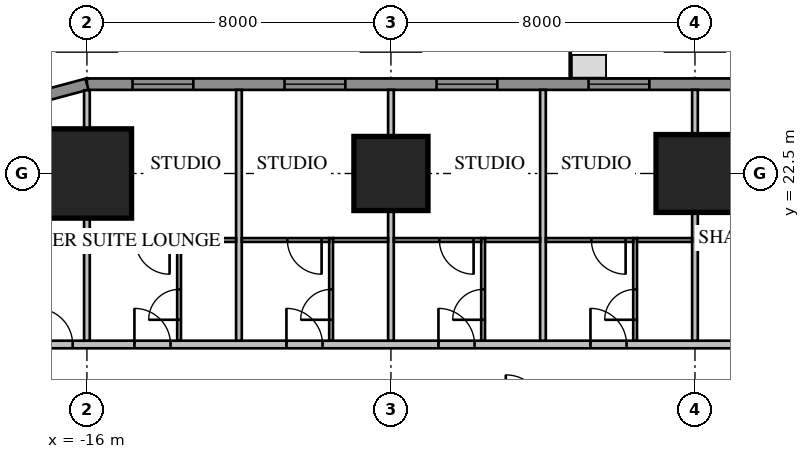
"""IFC4 building model, lengths in metres.
Left out: names, types, materials, properties, quantities, classifications, styles, units other than length and angle.
Written with IfcOpenShell. Run it as: python <this file> out.ifc"""

import sys

from ifc_helpers import new_model, si_unit, direction, frame, frame_2d, origin, origin_2d, place, context, subcontext, project, spatial, rectangle, extrude, element, fill, save


model = new_model("IFC4")
c1 = context("Model", 3, precision=1e-05, world=origin(), true_north=direction((0.0, 1.0)))
c2 = subcontext(c1, "Body", "Model", "MODEL_VIEW")
j1 = project(units=[si_unit("LENGTHUNIT", "METRE"), si_unit("PLANEANGLEUNIT", "RADIAN")], contexts=[c1])
p1 = place(None, origin())
s1 = spatial("IfcSite", under=j1, at=p1, CompositionType="ELEMENT")
p2 = place(p1, origin())
s2 = spatial("IfcBuilding", under=s1, at=p2, CompositionType="ELEMENT")
p3 = place(p2, frame((0.0, 0.0, 19.85)))
s3 = spatial("IfcBuildingStorey", under=s2, at=p3, CompositionType="ELEMENT", Elevation=19.85)
p4 = place(p3, frame((0.0, 22.5, 0.0), z_axis=(0.0, 0.0, 1.0), x_axis=(1.0, 0.0, 0.0)))
e1 = element("IfcColumn", 1, at=p4, inside=s3, PredefinedType="COLUMN", context=c2, shape_type="SweptSolid", body=[
    extrude(rectangle(XDim=2.05, YDim=2.05, at=origin_2d()), origin(), (0.0, 0.0, 1.0), 3.85),
])
p5 = place(p3, frame((-8.0, 22.5, 0.0), z_axis=(0.0, 0.0, 1.0), x_axis=(1.0, 0.0, 0.0)))
e2 = element("IfcColumn", 2, at=p5, inside=s3, PredefinedType="COLUMN", context=c2, shape_type="SweptSolid", body=[
    extrude(rectangle(XDim=1.95, YDim=1.95, at=origin_2d()), origin(), (0.0, 0.0, 1.0), 3.85),
])
p6 = place(p3, frame((-16.0, 22.5, 0.0), z_axis=(0.0, 0.0, 1.0), x_axis=(1.0, 0.0, 0.0)))
e3 = element("IfcColumn", 3, at=p6, inside=s3, PredefinedType="COLUMN", context=c2, shape_type="SweptSolid", body=[
    extrude(rectangle(XDim=2.35, YDim=2.35, at=origin_2d()), origin(), (0.0, 0.0, 1.0), 3.85),
])
p7 = place(p3, frame((16.0, 24.85, 0.0), z_axis=(0.0, 0.0, 1.0), x_axis=(-1.0, 0.0, 0.0)))
e4 = element("IfcWall", 4, at=p7, inside=s3, PredefinedType="SOLIDWALL", context=c2, shape_type="SweptSolid", body=[
    extrude(rectangle(XDim=32.0, YDim=0.3, at=frame_2d((16.0, 0.0))), origin(), (0.0, 0.0, 1.0), 3.65),
])
p8 = place(p7, frame((1.2, 0.0, 0.75)))
e5 = element("IfcOpeningElement", 5, at=p8, cuts=e4, PredefinedType="OPENING", context=c2, shape_type="SweptSolid", body=[
    extrude(rectangle(XDim=1.6, YDim=1.8, at=frame_2d((0.8, 0.9))), frame((0.0, 0.17, 0.0), z_axis=(0.0, -1.0, 0.0), x_axis=(1.0, 0.0, 0.0)), (0.0, 0.0, 1.0), 0.34),
])
p9 = place(p7, frame((5.2, 0.0, 0.75)))
e6 = element("IfcOpeningElement", 6, at=p9, cuts=e4, PredefinedType="OPENING", context=c2, shape_type="SweptSolid", body=[
    extrude(rectangle(XDim=1.6, YDim=1.8, at=frame_2d((0.8, 0.9))), frame((0.0, 0.17, 0.0), z_axis=(0.0, -1.0, 0.0), x_axis=(1.0, 0.0, 0.0)), (0.0, 0.0, 1.0), 0.34),
])
p10 = place(p7, frame((17.2, 0.0, 0.75)))
e7 = element("IfcOpeningElement", 7, at=p10, cuts=e4, PredefinedType="OPENING", context=c2, shape_type="SweptSolid", body=[
    extrude(rectangle(XDim=1.6, YDim=1.8, at=frame_2d((0.8, 0.9))), frame((0.0, 0.17, 0.0), z_axis=(0.0, -1.0, 0.0), x_axis=(1.0, 0.0, 0.0)), (0.0, 0.0, 1.0), 0.34),
])
p11 = place(p7, frame((21.2, 0.0, 0.75)))
e8 = element("IfcOpeningElement", 8, at=p11, cuts=e4, PredefinedType="OPENING", context=c2, shape_type="SweptSolid", body=[
    extrude(rectangle(XDim=1.6, YDim=1.8, at=frame_2d((0.8, 0.9))), frame((0.0, 0.17, 0.0), z_axis=(0.0, -1.0, 0.0), x_axis=(1.0, 0.0, 0.0)), (0.0, 0.0, 1.0), 0.34),
])
p12 = place(p7, frame((25.2, 0.0, 0.75)))
e9 = element("IfcOpeningElement", 9, at=p12, cuts=e4, PredefinedType="OPENING", context=c2, shape_type="SweptSolid", body=[
    extrude(rectangle(XDim=1.6, YDim=1.8, at=frame_2d((0.8, 0.9))), frame((0.0, 0.17, 0.0), z_axis=(0.0, -1.0, 0.0), x_axis=(1.0, 0.0, 0.0)), (0.0, 0.0, 1.0), 0.34),
])
p13 = place(p7, frame((29.2, 0.0, 0.75)))
e10 = element("IfcOpeningElement", 10, at=p13, cuts=e4, PredefinedType="OPENING", context=c2, shape_type="SweptSolid", body=[
    extrude(rectangle(XDim=1.6, YDim=1.8, at=frame_2d((0.8, 0.9))), frame((0.0, 0.17, 0.0), z_axis=(0.0, -1.0, 0.0), x_axis=(1.0, 0.0, 0.0)), (0.0, 0.0, 1.0), 0.34),
])
p14 = place(p7, frame((8.8, 0.0, 0.75)))
e11 = element("IfcOpeningElement", 11, at=p14, cuts=e4, PredefinedType="OPENING", context=c2, shape_type="SweptSolid", body=[
    extrude(rectangle(XDim=2.4, YDim=1.8, at=frame_2d((1.2, 0.9))), frame((0.0, 0.17, 0.0), z_axis=(0.0, -1.0, 0.0), x_axis=(1.0, 0.0, 0.0)), (0.0, 0.0, 1.0), 0.34),
])
p15 = place(p7, frame((13.812, 0.0, 0.0)))
e12 = element("IfcOpeningElement", 12, at=p15, cuts=e4, PredefinedType="OPENING", context=c2, shape_type="SweptSolid", body=[
    extrude(rectangle(XDim=1.0, YDim=2.4, at=frame_2d((0.5, 1.2))), frame((0.0, 0.17, 0.0), z_axis=(0.0, -1.0, 0.0), x_axis=(1.0, 0.0, 0.0)), (0.0, 0.0, 1.0), 0.34),
])
p16 = place(p3, frame((-16.0, 24.85, 0.0), z_axis=(0.0, 0.0, 1.0), x_axis=(-0.965920218567, -0.258839972501, 0.0)))
e13 = element("IfcWall", 13, at=p16, inside=s3, PredefinedType="SOLIDWALL", context=c2, shape_type="SweptSolid", body=[
    extrude(rectangle(XDim=4.581, YDim=0.3, at=frame_2d((2.291, 0.0))), origin(), (0.0, 0.0, 1.0), 3.65),
])
p17 = place(p3, frame((18.0, 18.0, 0.0), z_axis=(0.0, 0.0, 1.0), x_axis=(-1.0, 0.0, 0.0)))
e14 = element("IfcWall", 14, at=p17, inside=s3, PredefinedType="PARTITIONING", context=c2, shape_type="SweptSolid", body=[
    extrude(rectangle(XDim=36.0, YDim=0.2, at=frame_2d((18.0, 0.0))), origin(), (0.0, 0.0, 1.0), 3.65),
])
p18 = place(p17, frame((0.375, 0.0, 0.0)))
e15 = element("IfcOpeningElement", 15, at=p18, cuts=e14, PredefinedType="OPENING", context=c2, shape_type="SweptSolid", body=[
    extrude(rectangle(XDim=1.0, YDim=2.1, at=frame_2d((0.5, 1.05))), frame((0.0, 0.12, 0.0), z_axis=(0.0, -1.0, 0.0), x_axis=(1.0, 0.0, 0.0)), (0.0, 0.0, 1.0), 0.24),
])
p19 = place(p17, frame((3.8, 0.0, 0.0)))
e16 = element("IfcOpeningElement", 16, at=p19, cuts=e14, PredefinedType="OPENING", context=c2, shape_type="SweptSolid", body=[
    extrude(rectangle(XDim=0.95, YDim=2.1, at=frame_2d((0.475, 1.05))), frame((0.0, 0.12, 0.0), z_axis=(0.0, -1.0, 0.0), x_axis=(1.0, 0.0, 0.0)), (0.0, 0.0, 1.0), 0.24),
])
p20 = place(p17, frame((7.8, 0.0, 0.0)))
e17 = element("IfcOpeningElement", 17, at=p20, cuts=e14, PredefinedType="OPENING", context=c2, shape_type="SweptSolid", body=[
    extrude(rectangle(XDim=0.95, YDim=2.1, at=frame_2d((0.475, 1.05))), frame((0.0, 0.12, 0.0), z_axis=(0.0, -1.0, 0.0), x_axis=(1.0, 0.0, 0.0)), (0.0, 0.0, 1.0), 0.24),
])
p21 = place(p17, frame((19.8, 0.0, 0.0)))
e18 = element("IfcOpeningElement", 18, at=p21, cuts=e14, PredefinedType="OPENING", context=c2, shape_type="SweptSolid", body=[
    extrude(rectangle(XDim=0.95, YDim=2.1, at=frame_2d((0.475, 1.05))), frame((0.0, 0.12, 0.0), z_axis=(0.0, -1.0, 0.0), x_axis=(1.0, 0.0, 0.0)), (0.0, 0.0, 1.0), 0.24),
])
p22 = place(p17, frame((23.8, 0.0, 0.0)))
e19 = element("IfcOpeningElement", 19, at=p22, cuts=e14, PredefinedType="OPENING", context=c2, shape_type="SweptSolid", body=[
    extrude(rectangle(XDim=0.95, YDim=2.1, at=frame_2d((0.475, 1.05))), frame((0.0, 0.12, 0.0), z_axis=(0.0, -1.0, 0.0), x_axis=(1.0, 0.0, 0.0)), (0.0, 0.0, 1.0), 0.24),
])
p23 = place(p17, frame((27.8, 0.0, 0.0)))
e20 = element("IfcOpeningElement", 20, at=p23, cuts=e14, PredefinedType="OPENING", context=c2, shape_type="SweptSolid", body=[
    extrude(rectangle(XDim=0.95, YDim=2.1, at=frame_2d((0.475, 1.05))), frame((0.0, 0.12, 0.0), z_axis=(0.0, -1.0, 0.0), x_axis=(1.0, 0.0, 0.0)), (0.0, 0.0, 1.0), 0.24),
])
p24 = place(p17, frame((31.8, 0.0, 0.0)))
e21 = element("IfcOpeningElement", 21, at=p24, cuts=e14, PredefinedType="OPENING", context=c2, shape_type="SweptSolid", body=[
    extrude(rectangle(XDim=0.95, YDim=2.1, at=frame_2d((0.475, 1.05))), frame((0.0, 0.12, 0.0), z_axis=(0.0, -1.0, 0.0), x_axis=(1.0, 0.0, 0.0)), (0.0, 0.0, 1.0), 0.24),
])
p25 = place(p17, frame((34.375, 0.0, 0.0)))
e22 = element("IfcOpeningElement", 22, at=p25, cuts=e14, PredefinedType="OPENING", context=c2, shape_type="SweptSolid", body=[
    extrude(rectangle(XDim=0.95, YDim=2.1, at=frame_2d((0.475, 1.05))), frame((0.0, 0.12, 0.0), z_axis=(0.0, -1.0, 0.0), x_axis=(1.0, 0.0, 0.0)), (0.0, 0.0, 1.0), 0.24),
])
p26 = place(p17, frame((11.2, 0.0, 0.0)))
e23 = element("IfcOpeningElement", 23, at=p26, cuts=e14, PredefinedType="OPENING", context=c2, shape_type="SweptSolid", body=[
    extrude(rectangle(XDim=1.0, YDim=2.1, at=frame_2d((0.5, 1.05))), frame((0.0, 0.12, 0.0), z_axis=(0.0, -1.0, 0.0), x_axis=(1.0, 0.0, 0.0)), (0.0, 0.0, 1.0), 0.24),
])
p27 = place(p3, frame((0.0, 18.1, 0.0), z_axis=(0.0, 0.0, 1.0), x_axis=(0.0, 1.0, 0.0)))
e24 = element("IfcWall", 24, at=p27, inside=s3, PredefinedType="PARTITIONING", context=c2, shape_type="SweptSolid", body=[
    extrude(rectangle(XDim=6.6, YDim=0.15, at=frame_2d((3.3, 0.0))), origin(), (0.0, 0.0, 1.0), 2.809),
])
for number, where, z_axis, x_axis in (
    (25, (-4.0, 18.1, 0.0), (0.0, 0.0, 1.0), (0.0, 1.0, 0.0)),
    (26, (-8.0, 18.1, 0.0), (0.0, 0.0, 1.0), (0.0, 1.0, 0.0)),
    (27, (-12.0, 18.1, 0.0), (0.0, 0.0, 1.0), (0.0, 1.0, 0.0)),
):
    element("IfcWall", number, at=place(p3, frame(where, z_axis=z_axis, x_axis=x_axis)), inside=s3, PredefinedType="PARTITIONING", context=c2, shape_type="SweptSolid", body=[
        extrude(rectangle(XDim=6.6, YDim=0.15, at=frame_2d((3.3, 0.0))), origin(), (0.0, 0.0, 1.0), 3.65),
    ])
p28 = place(p3, frame((-16.0, 18.1, 0.0), z_axis=(0.0, 0.0, 1.0), x_axis=(0.0, 1.0, 0.0)))
e28 = element("IfcWall", 28, at=p28, inside=s3, PredefinedType="PARTITIONING", context=c2, shape_type="SweptSolid", body=[
    extrude(rectangle(XDim=6.589, YDim=0.15, at=frame_2d((3.295, 0.0))), origin(), (0.0, 0.0, 1.0), 3.65),
])
p29 = place(p3, frame((-1.575, 18.1, 0.0), z_axis=(0.0, 0.0, 1.0), x_axis=(0.0, 1.0, 0.0)))
e29 = element("IfcWall", 29, at=p29, inside=s3, PredefinedType="PARTITIONING", context=c2, shape_type="SweptSolid", body=[
    extrude(rectangle(XDim=2.7, YDim=0.1, at=frame_2d((1.35, 0.0))), origin(), (0.0, 0.0, 1.0), 3.65),
])
p30 = place(p29, frame((0.55, 0.0, 0.0)))
e30 = element("IfcOpeningElement", 30, at=p30, cuts=e29, PredefinedType="OPENING", context=c2, shape_type="SweptSolid", body=[
    extrude(rectangle(XDim=0.8, YDim=2.1, at=frame_2d((0.4, 1.05))), frame((0.0, 0.07, 0.0), z_axis=(0.0, -1.0, 0.0), x_axis=(1.0, 0.0, 0.0)), (0.0, 0.0, 1.0), 0.14),
])
p31 = place(p3, frame((-0.075, 20.75, 0.0), z_axis=(0.0, 0.0, 1.0), x_axis=(-1.0, 0.0, 0.0)))
e31 = element("IfcWall", 31, at=p31, inside=s3, PredefinedType="PARTITIONING", context=c2, shape_type="SweptSolid", body=[
    extrude(rectangle(XDim=1.45, YDim=0.1, at=frame_2d((0.725, 0.0))), origin(), (0.0, 0.0, 1.0), 3.65),
])
p32 = place(p3, frame((-5.575, 18.1, 0.0), z_axis=(0.0, 0.0, 1.0), x_axis=(0.0, 1.0, 0.0)))
e32 = element("IfcWall", 32, at=p32, inside=s3, PredefinedType="PARTITIONING", context=c2, shape_type="SweptSolid", body=[
    extrude(rectangle(XDim=2.7, YDim=0.1, at=frame_2d((1.35, 0.0))), origin(), (0.0, 0.0, 1.0), 3.65),
])
p33 = place(p32, frame((0.55, 0.0, 0.0)))
e33 = element("IfcOpeningElement", 33, at=p33, cuts=e32, PredefinedType="OPENING", context=c2, shape_type="SweptSolid", body=[
    extrude(rectangle(XDim=0.8, YDim=2.1, at=frame_2d((0.4, 1.05))), frame((0.0, 0.07, 0.0), z_axis=(0.0, -1.0, 0.0), x_axis=(1.0, 0.0, 0.0)), (0.0, 0.0, 1.0), 0.14),
])
p34 = place(p3, frame((-4.075, 20.75, 0.0), z_axis=(0.0, 0.0, 1.0), x_axis=(-1.0, 0.0, 0.0)))
e34 = element("IfcWall", 34, at=p34, inside=s3, PredefinedType="PARTITIONING", context=c2, shape_type="SweptSolid", body=[
    extrude(rectangle(XDim=1.45, YDim=0.1, at=frame_2d((0.725, 0.0))), origin(), (0.0, 0.0, 1.0), 3.65),
])
p35 = place(p3, frame((-9.575, 18.1, 0.0), z_axis=(0.0, 0.0, 1.0), x_axis=(0.0, 1.0, 0.0)))
e35 = element("IfcWall", 35, at=p35, inside=s3, PredefinedType="PARTITIONING", context=c2, shape_type="SweptSolid", body=[
    extrude(rectangle(XDim=2.7, YDim=0.1, at=frame_2d((1.35, 0.0))), origin(), (0.0, 0.0, 1.0), 3.65),
])
p36 = place(p35, frame((0.55, 0.0, 0.0)))
e36 = element("IfcOpeningElement", 36, at=p36, cuts=e35, PredefinedType="OPENING", context=c2, shape_type="SweptSolid", body=[
    extrude(rectangle(XDim=0.8, YDim=2.1, at=frame_2d((0.4, 1.05))), frame((0.0, 0.07, 0.0), z_axis=(0.0, -1.0, 0.0), x_axis=(1.0, 0.0, 0.0)), (0.0, 0.0, 1.0), 0.14),
])
p37 = place(p3, frame((-8.075, 20.75, 0.0), z_axis=(0.0, 0.0, 1.0), x_axis=(-1.0, 0.0, 0.0)))
e37 = element("IfcWall", 37, at=p37, inside=s3, PredefinedType="PARTITIONING", context=c2, shape_type="SweptSolid", body=[
    extrude(rectangle(XDim=1.45, YDim=0.1, at=frame_2d((0.725, 0.0))), origin(), (0.0, 0.0, 1.0), 3.65),
])
p38 = place(p3, frame((-13.575, 18.1, 0.0), z_axis=(0.0, 0.0, 1.0), x_axis=(0.0, 1.0, 0.0)))
e38 = element("IfcWall", 38, at=p38, inside=s3, PredefinedType="PARTITIONING", context=c2, shape_type="SweptSolid", body=[
    extrude(rectangle(XDim=2.7, YDim=0.1, at=frame_2d((1.35, 0.0))), origin(), (0.0, 0.0, 1.0), 3.65),
])
p39 = place(p38, frame((0.55, 0.0, 0.0)))
e39 = element("IfcOpeningElement", 39, at=p39, cuts=e38, PredefinedType="OPENING", context=c2, shape_type="SweptSolid", body=[
    extrude(rectangle(XDim=0.8, YDim=2.1, at=frame_2d((0.4, 1.05))), frame((0.0, 0.07, 0.0), z_axis=(0.0, -1.0, 0.0), x_axis=(1.0, 0.0, 0.0)), (0.0, 0.0, 1.0), 0.14),
])
p40 = place(p3, frame((-12.075, 20.75, 0.0), z_axis=(0.0, 0.0, 1.0), x_axis=(-1.0, 0.0, 0.0)))
e40 = element("IfcWall", 40, at=p40, inside=s3, PredefinedType="PARTITIONING", context=c2, shape_type="SweptSolid", body=[
    extrude(rectangle(XDim=1.45, YDim=0.1, at=frame_2d((0.725, 0.0))), origin(), (0.0, 0.0, 1.0), 3.65),
])
p41 = place(p3, frame((-1.625, 20.75, 0.0), z_axis=(0.0, 0.0, 1.0), x_axis=(-1.0, 0.0, 0.0)))
e41 = element("IfcWall", 41, at=p41, inside=s3, PredefinedType="PARTITIONING", context=c2, shape_type="SweptSolid", body=[
    extrude(rectangle(XDim=2.3, YDim=0.1, at=frame_2d((1.15, 0.0))), origin(), (0.0, 0.0, 1.0), 3.65),
])
p42 = place(p41, frame((0.2, 0.0, 0.0)))
e42 = element("IfcOpeningElement", 42, at=p42, cuts=e41, PredefinedType="OPENING", context=c2, shape_type="SweptSolid", body=[
    extrude(rectangle(XDim=0.9, YDim=2.1, at=frame_2d((0.45, 1.05))), frame((0.0, 0.07, 0.0), z_axis=(0.0, -1.0, 0.0), x_axis=(1.0, 0.0, 0.0)), (0.0, 0.0, 1.0), 0.14),
])
p43 = place(p3, frame((-5.625, 20.75, 0.0), z_axis=(0.0, 0.0, 1.0), x_axis=(-1.0, 0.0, 0.0)))
e43 = element("IfcWall", 43, at=p43, inside=s3, PredefinedType="PARTITIONING", context=c2, shape_type="SweptSolid", body=[
    extrude(rectangle(XDim=2.3, YDim=0.1, at=frame_2d((1.15, 0.0))), origin(), (0.0, 0.0, 1.0), 3.65),
])
p44 = place(p43, frame((0.2, 0.0, 0.0)))
e44 = element("IfcOpeningElement", 44, at=p44, cuts=e43, PredefinedType="OPENING", context=c2, shape_type="SweptSolid", body=[
    extrude(rectangle(XDim=0.9, YDim=2.1, at=frame_2d((0.45, 1.05))), frame((0.0, 0.07, 0.0), z_axis=(0.0, -1.0, 0.0), x_axis=(1.0, 0.0, 0.0)), (0.0, 0.0, 1.0), 0.14),
])
p45 = place(p3, frame((-9.625, 20.75, 0.0), z_axis=(0.0, 0.0, 1.0), x_axis=(-1.0, 0.0, 0.0)))
e45 = element("IfcWall", 45, at=p45, inside=s3, PredefinedType="PARTITIONING", context=c2, shape_type="SweptSolid", body=[
    extrude(rectangle(XDim=2.3, YDim=0.1, at=frame_2d((1.15, 0.0))), origin(), (0.0, 0.0, 1.0), 3.65),
])
p46 = place(p45, frame((0.2, 0.0, 0.0)))
e46 = element("IfcOpeningElement", 46, at=p46, cuts=e45, PredefinedType="OPENING", context=c2, shape_type="SweptSolid", body=[
    extrude(rectangle(XDim=0.9, YDim=2.1, at=frame_2d((0.45, 1.05))), frame((0.0, 0.07, 0.0), z_axis=(0.0, -1.0, 0.0), x_axis=(1.0, 0.0, 0.0)), (0.0, 0.0, 1.0), 0.14),
])
p47 = place(p3, frame((-13.625, 20.75, 0.0), z_axis=(0.0, 0.0, 1.0), x_axis=(-1.0, 0.0, 0.0)))
e47 = element("IfcWall", 47, at=p47, inside=s3, PredefinedType="PARTITIONING", context=c2, shape_type="SweptSolid", body=[
    extrude(rectangle(XDim=2.3, YDim=0.1, at=frame_2d((1.15, 0.0))), origin(), (0.0, 0.0, 1.0), 3.65),
])
p48 = place(p47, frame((0.2, 0.0, 0.0)))
e48 = element("IfcOpeningElement", 48, at=p48, cuts=e47, PredefinedType="OPENING", context=c2, shape_type="SweptSolid", body=[
    extrude(rectangle(XDim=0.9, YDim=2.1, at=frame_2d((0.45, 1.05))), frame((0.0, 0.07, 0.0), z_axis=(0.0, -1.0, 0.0), x_axis=(1.0, 0.0, 0.0)), (0.0, 0.0, 1.0), 0.14),
])
p49 = place(p10, origin())
e49 = element("IfcWindow", 49, at=p49, inside=s3, PartitioningType="SINGLE_PANEL", PredefinedType="WINDOW", context=c2, shape_type="SweptSolid", body=[
    extrude(rectangle(XDim=1.6, YDim=1.8, at=frame_2d((0.8, 0.9))), frame((0.0, 0.03, 0.0), z_axis=(0.0, -1.0, 0.0), x_axis=(1.0, 0.0, 0.0)), (0.0, 0.0, 1.0), 0.06),
])
fill(e7, e49)
p50 = place(p11, origin())
e50 = element("IfcWindow", 50, at=p50, inside=s3, PartitioningType="SINGLE_PANEL", PredefinedType="WINDOW", context=c2, shape_type="SweptSolid", body=[
    extrude(rectangle(XDim=1.6, YDim=1.8, at=frame_2d((0.8, 0.9))), frame((0.0, 0.03, 0.0), z_axis=(0.0, -1.0, 0.0), x_axis=(1.0, 0.0, 0.0)), (0.0, 0.0, 1.0), 0.06),
])
fill(e8, e50)
p51 = place(p12, origin())
e51 = element("IfcWindow", 51, at=p51, inside=s3, PartitioningType="SINGLE_PANEL", PredefinedType="WINDOW", context=c2, shape_type="SweptSolid", body=[
    extrude(rectangle(XDim=1.6, YDim=1.8, at=frame_2d((0.8, 0.9))), frame((0.0, 0.03, 0.0), z_axis=(0.0, -1.0, 0.0), x_axis=(1.0, 0.0, 0.0)), (0.0, 0.0, 1.0), 0.06),
])
fill(e9, e51)
p52 = place(p13, origin())
e52 = element("IfcWindow", 52, at=p52, inside=s3, PartitioningType="SINGLE_PANEL", PredefinedType="WINDOW", context=c2, shape_type="SweptSolid", body=[
    extrude(rectangle(XDim=1.6, YDim=1.8, at=frame_2d((0.8, 0.9))), frame((0.0, 0.03, 0.0), z_axis=(0.0, -1.0, 0.0), x_axis=(1.0, 0.0, 0.0)), (0.0, 0.0, 1.0), 0.06),
])
fill(e10, e52)
p53 = place(p21, origin())
e53 = element("IfcDoor", 53, at=p53, inside=s3, OperationType="SINGLE_SWING_RIGHT", PredefinedType="DOOR", context=c2, shape_type="SweptSolid", body=[
    extrude(rectangle(XDim=0.95, YDim=2.1, at=frame_2d((0.475, 1.05))), frame((0.0, 0.025, 0.0), z_axis=(0.0, -1.0, 0.0), x_axis=(1.0, 0.0, 0.0)), (0.0, 0.0, 1.0), 0.05),
])
fill(e18, e53)
p54 = place(p30, origin())
e54 = element("IfcDoor", 54, at=p54, inside=s3, OperationType="SINGLE_SWING_LEFT", PredefinedType="DOOR", context=c2, shape_type="SweptSolid", body=[
    extrude(rectangle(XDim=0.8, YDim=2.1, at=frame_2d((0.4, 1.05))), frame((0.0, 0.025, 0.0), z_axis=(0.0, -1.0, 0.0), x_axis=(1.0, 0.0, 0.0)), (0.0, 0.0, 1.0), 0.05),
])
fill(e30, e54)
p55 = place(p22, origin())
e55 = element("IfcDoor", 55, at=p55, inside=s3, OperationType="SINGLE_SWING_RIGHT", PredefinedType="DOOR", context=c2, shape_type="SweptSolid", body=[
    extrude(rectangle(XDim=0.95, YDim=2.1, at=frame_2d((0.475, 1.05))), frame((0.0, 0.025, 0.0), z_axis=(0.0, -1.0, 0.0), x_axis=(1.0, 0.0, 0.0)), (0.0, 0.0, 1.0), 0.05),
])
fill(e19, e55)
p56 = place(p33, origin())
e56 = element("IfcDoor", 56, at=p56, inside=s3, OperationType="SINGLE_SWING_LEFT", PredefinedType="DOOR", context=c2, shape_type="SweptSolid", body=[
    extrude(rectangle(XDim=0.8, YDim=2.1, at=frame_2d((0.4, 1.05))), frame((0.0, 0.025, 0.0), z_axis=(0.0, -1.0, 0.0), x_axis=(1.0, 0.0, 0.0)), (0.0, 0.0, 1.0), 0.05),
])
fill(e33, e56)
p57 = place(p23, origin())
e57 = element("IfcDoor", 57, at=p57, inside=s3, OperationType="SINGLE_SWING_RIGHT", PredefinedType="DOOR", context=c2, shape_type="SweptSolid", body=[
    extrude(rectangle(XDim=0.95, YDim=2.1, at=frame_2d((0.475, 1.05))), frame((0.0, 0.025, 0.0), z_axis=(0.0, -1.0, 0.0), x_axis=(1.0, 0.0, 0.0)), (0.0, 0.0, 1.0), 0.05),
])
fill(e20, e57)
p58 = place(p36, origin())
e58 = element("IfcDoor", 58, at=p58, inside=s3, OperationType="SINGLE_SWING_LEFT", PredefinedType="DOOR", context=c2, shape_type="SweptSolid", body=[
    extrude(rectangle(XDim=0.8, YDim=2.1, at=frame_2d((0.4, 1.05))), frame((0.0, 0.025, 0.0), z_axis=(0.0, -1.0, 0.0), x_axis=(1.0, 0.0, 0.0)), (0.0, 0.0, 1.0), 0.05),
])
fill(e36, e58)
p59 = place(p24, origin())
e59 = element("IfcDoor", 59, at=p59, inside=s3, OperationType="SINGLE_SWING_RIGHT", PredefinedType="DOOR", context=c2, shape_type="SweptSolid", body=[
    extrude(rectangle(XDim=0.95, YDim=2.1, at=frame_2d((0.475, 1.05))), frame((0.0, 0.025, 0.0), z_axis=(0.0, -1.0, 0.0), x_axis=(1.0, 0.0, 0.0)), (0.0, 0.0, 1.0), 0.05),
])
fill(e21, e59)
p60 = place(p39, origin())
e60 = element("IfcDoor", 60, at=p60, inside=s3, OperationType="SINGLE_SWING_LEFT", PredefinedType="DOOR", context=c2, shape_type="SweptSolid", body=[
    extrude(rectangle(XDim=0.8, YDim=2.1, at=frame_2d((0.4, 1.05))), frame((0.0, 0.025, 0.0), z_axis=(0.0, -1.0, 0.0), x_axis=(1.0, 0.0, 0.0)), (0.0, 0.0, 1.0), 0.05),
])
fill(e39, e60)
p61 = place(p25, origin())
e61 = element("IfcDoor", 61, at=p61, inside=s3, OperationType="SINGLE_SWING_RIGHT", PredefinedType="DOOR", context=c2, shape_type="SweptSolid", body=[
    extrude(rectangle(XDim=0.95, YDim=2.1, at=frame_2d((0.475, 1.05))), frame((0.0, 0.025, 0.0), z_axis=(0.0, -1.0, 0.0), x_axis=(1.0, 0.0, 0.0)), (0.0, 0.0, 1.0), 0.05),
])
fill(e22, e61)
p62 = place(p42, origin())
e62 = element("IfcDoor", 62, at=p62, inside=s3, OperationType="SINGLE_SWING_LEFT", PredefinedType="DOOR", context=c2, shape_type="SweptSolid", body=[
    extrude(rectangle(XDim=0.9, YDim=2.1, at=frame_2d((0.45, 1.05))), frame((0.0, 0.025, 0.0), z_axis=(0.0, -1.0, 0.0), x_axis=(1.0, 0.0, 0.0)), (0.0, 0.0, 1.0), 0.05),
])
fill(e42, e62)
p63 = place(p44, origin())
e63 = element("IfcDoor", 63, at=p63, inside=s3, OperationType="SINGLE_SWING_LEFT", PredefinedType="DOOR", context=c2, shape_type="SweptSolid", body=[
    extrude(rectangle(XDim=0.9, YDim=2.1, at=frame_2d((0.45, 1.05))), frame((0.0, 0.025, 0.0), z_axis=(0.0, -1.0, 0.0), x_axis=(1.0, 0.0, 0.0)), (0.0, 0.0, 1.0), 0.05),
])
fill(e44, e63)
p64 = place(p46, origin())
e64 = element("IfcDoor", 64, at=p64, inside=s3, OperationType="SINGLE_SWING_LEFT", PredefinedType="DOOR", context=c2, shape_type="SweptSolid", body=[
    extrude(rectangle(XDim=0.9, YDim=2.1, at=frame_2d((0.45, 1.05))), frame((0.0, 0.025, 0.0), z_axis=(0.0, -1.0, 0.0), x_axis=(1.0, 0.0, 0.0)), (0.0, 0.0, 1.0), 0.05),
])
fill(e46, e64)
p65 = place(p48, origin())
e65 = element("IfcDoor", 65, at=p65, inside=s3, OperationType="SINGLE_SWING_LEFT", PredefinedType="DOOR", context=c2, shape_type="SweptSolid", body=[
    extrude(rectangle(XDim=0.9, YDim=2.1, at=frame_2d((0.45, 1.05))), frame((0.0, 0.025, 0.0), z_axis=(0.0, -1.0, 0.0), x_axis=(1.0, 0.0, 0.0)), (0.0, 0.0, 1.0), 0.05),
])
fill(e48, e65)
save(model, sys.argv[1])
